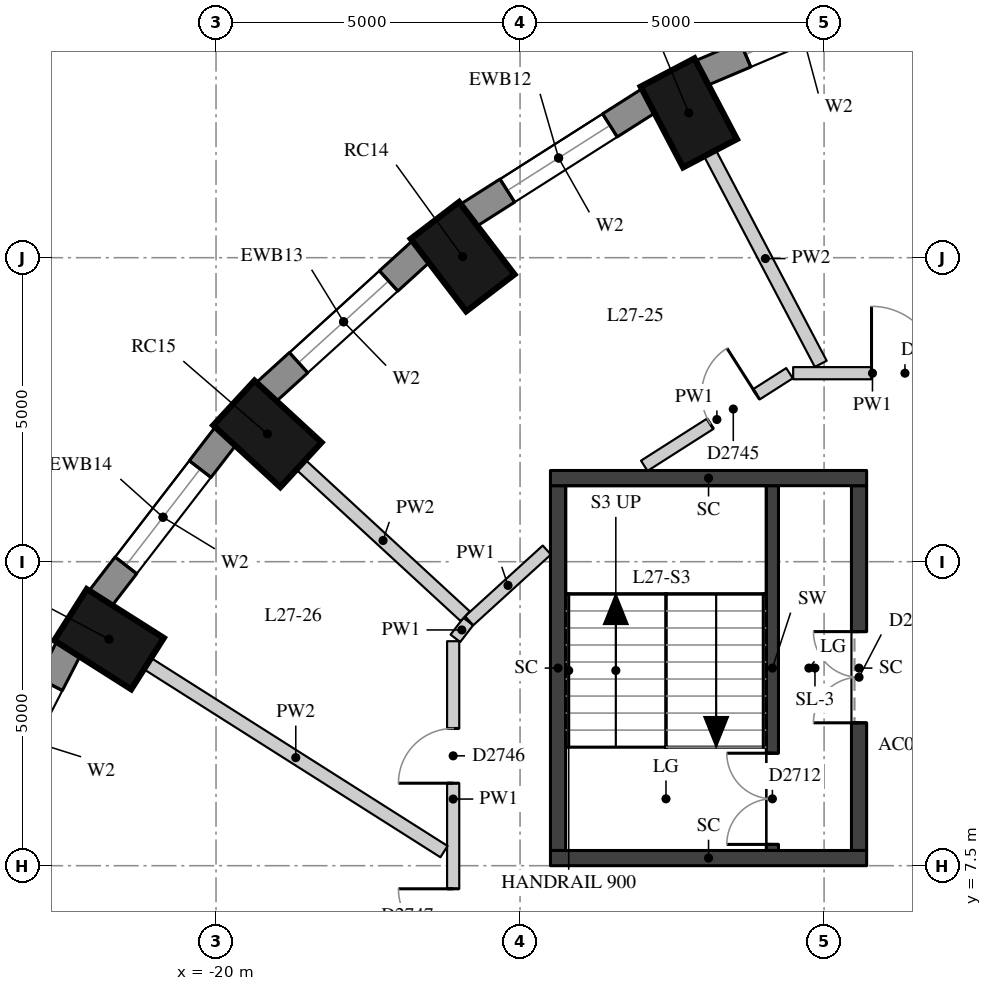
"""IFC4 building model, lengths in metres.
Left out: names, types, materials, properties, quantities, classifications, styles, units other than length and angle.
Written with IfcOpenShell. Run it as: python <this file> out.ifc"""

import sys

from ifc_helpers import new_model, si_unit, direction, frame, frame_2d, origin, origin_2d, place, context, subcontext, project, spatial, rectangle, extrude, element, fill, save


model = new_model("IFC4")
c1 = context("Model", 3, precision=1e-05, world=origin(), true_north=direction((0.0, 1.0)))
c2 = subcontext(c1, "Body", "Model", "MODEL_VIEW")
j1 = project(units=[si_unit("LENGTHUNIT", "METRE"), si_unit("PLANEANGLEUNIT", "RADIAN")], contexts=[c1])
p1 = place(None, origin())
s1 = spatial("IfcSite", under=j1, at=p1, CompositionType="ELEMENT")
p2 = place(p1, origin())
s2 = spatial("IfcBuilding", under=s1, at=p2, CompositionType="ELEMENT")
p3 = place(p2, frame((0.0, 0.0, 98.8)))
s3 = spatial("IfcBuildingStorey", under=s2, at=p3, CompositionType="ELEMENT", Elevation=98.8)
for number, where, z_axis, x_axis in (
    (1, (-8.11, 21.624, 0.0), (0.0, 0.0, 1.0), (-0.315, 0.949, 0.0)),
    (2, (-12.225, 19.882, 0.0), (0.0, 0.0, 1.0), (-0.465, 0.885, 0.0)),
    (3, (-15.945, 17.517, 0.0), (0.0, 0.0, 1.0), (-0.607, 0.795, 0.0)),
    (4, (-19.156, 14.602, 0.0), (0.0, 0.0, 1.0), (-0.735, 0.678, 0.0)),
    (5, (-21.76, 11.225, 0.0), (0.0, 0.0, 1.0), (-0.845, 0.536, 0.0)),
):
    element("IfcColumn", number, at=place(p3, frame(where, z_axis=z_axis, x_axis=x_axis)), inside=s3, PredefinedType="COLUMN", context=c2, shape_type="SweptSolid", body=[
        extrude(rectangle(XDim=1.5, YDim=1.0, at=origin_2d()), origin(), (0.0, 0.0, 1.0), 3.3),
    ])
p4 = place(p3, frame((-8.718, 21.934, 0.0), z_axis=(0.0, 0.0, 1.0), x_axis=(-0.920879975612, -0.389846213932, 0.0)))
e6 = element("IfcWall", 6, at=p4, inside=s3, PredefinedType="SOLIDWALL", context=c2, shape_type="SweptSolid", body=[
    extrude(rectangle(XDim=3.592, YDim=0.45, at=frame_2d((1.796, 0.0))), origin(), (0.0, 0.0, 1.0), 3.02),
])
p5 = place(p4, frame((0.796, 0.0, 0.4)))
e7 = element("IfcOpeningElement", 7, at=p5, cuts=e6, PredefinedType="OPENING", context=c2, shape_type="SweptSolid", body=[
    extrude(rectangle(XDim=2.0, YDim=1.75, at=frame_2d((1.0, 0.875))), frame((0.0, 0.235, 0.0), z_axis=(0.0, -1.0, 0.0), x_axis=(1.0, 0.0, 0.0)), (0.0, 0.0, 1.0), 0.47),
])
p6 = place(p3, frame((-12.875, 20.087, 0.0), z_axis=(0.0, 0.0, 1.0), x_axis=(-0.843860651879, -0.536562391722, 0.0)))
e8 = element("IfcWall", 8, at=p6, inside=s3, PredefinedType="SOLIDWALL", context=c2, shape_type="SweptSolid", body=[
    extrude(rectangle(XDim=3.532, YDim=0.45, at=frame_2d((1.766, 0.0))), origin(), (0.0, 0.0, 1.0), 3.02),
])
p7 = place(p6, frame((0.766, 0.0, 0.4)))
e9 = element("IfcOpeningElement", 9, at=p7, cuts=e8, PredefinedType="OPENING", context=c2, shape_type="SweptSolid", body=[
    extrude(rectangle(XDim=2.0, YDim=1.75, at=frame_2d((1.0, 0.875))), frame((0.0, 0.235, 0.0), z_axis=(0.0, -1.0, 0.0), x_axis=(1.0, 0.0, 0.0)), (0.0, 0.0, 1.0), 0.47),
])
p8 = place(p3, frame((-16.62, 17.61, 0.0), z_axis=(0.0, 0.0, 1.0), x_axis=(-0.74032902847, -0.672244694739, 0.0)))
e10 = element("IfcWall", 10, at=p8, inside=s3, PredefinedType="SOLIDWALL", context=c2, shape_type="SweptSolid", body=[
    extrude(rectangle(XDim=3.464, YDim=0.45, at=frame_2d((1.732, 0.0))), origin(), (0.0, 0.0, 1.0), 3.02),
])
p9 = place(p8, frame((0.732, 0.0, 0.4)))
e11 = element("IfcOpeningElement", 11, at=p9, cuts=e10, PredefinedType="OPENING", context=c2, shape_type="SweptSolid", body=[
    extrude(rectangle(XDim=2.0, YDim=1.75, at=frame_2d((1.0, 0.875))), frame((0.0, 0.235, 0.0), z_axis=(0.0, -1.0, 0.0), x_axis=(1.0, 0.0, 0.0)), (0.0, 0.0, 1.0), 0.47),
])
p10 = place(p3, frame((-19.835, 14.575, 0.0), z_axis=(0.0, 0.0, 1.0), x_axis=(-0.610693945156, -0.791866721961, 0.0)))
e12 = element("IfcWall", 12, at=p10, inside=s3, PredefinedType="SOLIDWALL", context=c2, shape_type="SweptSolid", body=[
    extrude(rectangle(XDim=3.395, YDim=0.45, at=frame_2d((1.697, 0.0))), origin(), (0.0, 0.0, 1.0), 3.02),
])
p11 = place(p10, frame((0.697, 0.0, 0.4)))
e13 = element("IfcOpeningElement", 13, at=p11, cuts=e12, PredefinedType="OPENING", context=c2, shape_type="SweptSolid", body=[
    extrude(rectangle(XDim=2.0, YDim=1.75, at=frame_2d((1.0, 0.875))), frame((0.0, 0.235, 0.0), z_axis=(0.0, -1.0, 0.0), x_axis=(1.0, 0.0, 0.0)), (0.0, 0.0, 1.0), 0.47),
])
p12 = place(p3, frame((-22.423, 11.077, 0.0), z_axis=(0.0, 0.0, 1.0), x_axis=(-0.456828186229, -0.889554949549, 0.0)))
e14 = element("IfcWall", 14, at=p12, inside=s3, PredefinedType="SOLIDWALL", context=c2, shape_type="SweptSolid", body=[
    extrude(rectangle(XDim=3.333, YDim=0.45, at=frame_2d((1.667, 0.0))), origin(), (0.0, 0.0, 1.0), 3.02),
])
p13 = place(p12, frame((0.666, 0.0, 0.4)))
e15 = element("IfcOpeningElement", 15, at=p13, cuts=e14, PredefinedType="OPENING", context=c2, shape_type="SweptSolid", body=[
    extrude(rectangle(XDim=2.0, YDim=1.75, at=frame_2d((1.0, 0.875))), frame((0.0, 0.235, 0.0), z_axis=(0.0, -1.0, 0.0), x_axis=(1.0, 0.0, 0.0)), (0.0, 0.0, 1.0), 0.47),
])
p14 = place(p3, frame((-10.85, 7.75, 0.0), z_axis=(0.0, 0.0, 1.0), x_axis=(0.0, 1.0, 0.0)))
e16 = element("IfcWall", 16, at=p14, inside=s3, PredefinedType="SHEAR", context=c2, shape_type="SweptSolid", body=[
    extrude(rectangle(XDim=6.0, YDim=0.2, at=frame_2d((3.0, 0.0))), origin(), (0.0, 0.0, 1.0), 3.02),
])
p15 = place(p14, frame((0.1, 0.0, 0.0)))
e17 = element("IfcOpeningElement", 17, at=p15, cuts=e16, PredefinedType="OPENING", context=c2, shape_type="SweptSolid", body=[
    extrude(rectangle(XDim=1.5, YDim=2.1, at=frame_2d((0.75, 1.05))), frame((0.0, 0.11, 0.0), z_axis=(0.0, -1.0, 0.0), x_axis=(1.0, 0.0, 0.0)), (0.0, 0.0, 1.0), 0.22),
])
p16 = place(p3, frame((-14.375, 7.75, -0.28), z_axis=(0.0, 0.0, 1.0), x_axis=(0.0, 1.0, 0.0)))
e18 = element("IfcWall", 18, at=p16, inside=s3, PredefinedType="SHEAR", context=c2, shape_type="SweptSolid", body=[
    extrude(rectangle(XDim=6.0, YDim=0.25, at=frame_2d((3.0, 0.0))), origin(), (0.0, 0.0, 1.0), 3.3),
])
p17 = place(p3, frame((-9.425, 7.75, -0.28), z_axis=(0.0, 0.0, 1.0), x_axis=(0.0, 1.0, 0.0)))
e19 = element("IfcWall", 19, at=p17, inside=s3, PredefinedType="SHEAR", context=c2, shape_type="SweptSolid", body=[
    extrude(rectangle(XDim=6.0, YDim=0.25, at=frame_2d((3.0, 0.0))), origin(), (0.0, 0.0, 1.0), 3.3),
])
p18 = place(p17, frame((2.1, 0.0, 0.28)))
e20 = element("IfcOpeningElement", 20, at=p18, cuts=e19, PredefinedType="OPENING", context=c2, shape_type="SweptSolid", body=[
    extrude(rectangle(XDim=1.5, YDim=2.1, at=frame_2d((0.75, 1.05))), frame((0.0, 0.135, 0.0), z_axis=(0.0, -1.0, 0.0), x_axis=(1.0, 0.0, 0.0)), (0.0, 0.0, 1.0), 0.27),
])
for number, where, z_axis, x_axis in (
    (21, (-14.5, 13.875, -0.28), (0.0, 0.0, 1.0), (1.0, 0.0, 0.0)),
    (22, (-14.5, 7.625, -0.28), (0.0, 0.0, 1.0), (1.0, 0.0, 0.0)),
):
    element("IfcWall", number, at=place(p3, frame(where, z_axis=z_axis, x_axis=x_axis)), inside=s3, PredefinedType="SHEAR", context=c2, shape_type="SweptSolid", body=[
        extrude(rectangle(XDim=5.2, YDim=0.25, at=frame_2d((2.6, 0.0))), origin(), (0.0, 0.0, 1.0), 3.3),
    ])
p19 = place(p3, frame((-16.1, 6.0, 0.0), z_axis=(0.0, 0.0, 1.0), x_axis=(0.0, 1.0, 0.0)))
e23 = element("IfcWall", 23, at=p19, inside=s3, PredefinedType="PARTITIONING", context=c2, shape_type="SweptSolid", body=[
    extrude(rectangle(XDim=5.192, YDim=0.2, at=frame_2d((2.596, 0.0))), origin(), (0.0, 0.0, 1.0), 3.02),
])
p20 = place(p19, frame((2.857, 0.0, 0.0)))
e24 = element("IfcOpeningElement", 24, at=p20, cuts=e23, PredefinedType="OPENING", context=c2, shape_type="SweptSolid", body=[
    extrude(rectangle(XDim=0.9, YDim=2.1, at=frame_2d((0.45, 1.05))), frame((0.0, 0.11, 0.0), z_axis=(0.0, -1.0, 0.0), x_axis=(1.0, 0.0, 0.0)), (0.0, 0.0, 1.0), 0.22),
])
p21 = place(p19, frame((0.22, 0.0, 0.0)))
e25 = element("IfcOpeningElement", 25, at=p21, cuts=e23, PredefinedType="OPENING", context=c2, shape_type="SweptSolid", body=[
    extrude(rectangle(XDim=0.9, YDim=2.1, at=frame_2d((0.45, 1.05))), frame((0.0, 0.11, 0.0), z_axis=(0.0, -1.0, 0.0), x_axis=(1.0, 0.0, 0.0)), (0.0, 0.0, 1.0), 0.22),
])
p22 = place(p3, frame((-16.063, 11.24, 0.0), z_axis=(0.0, 0.0, 1.0), x_axis=(0.609744747854, 0.792597844096, 0.0)))
e26 = element("IfcWall", 26, at=p22, inside=s3, PredefinedType="PARTITIONING", context=c2, shape_type="SweptSolid", body=[
    extrude(rectangle(XDim=0.347, YDim=0.2, at=frame_2d((0.174, 0.0))), origin(), (0.0, 0.0, 1.0), 3.02),
])
p23 = place(p3, frame((-15.837, 11.528, 0.0), z_axis=(0.0, 0.0, 1.0), x_axis=(0.739402681643, 0.673263450946, 0.0)))
e27 = element("IfcWall", 27, at=p23, inside=s3, PredefinedType="PARTITIONING", context=c2, shape_type="SweptSolid", body=[
    extrude(rectangle(XDim=1.728, YDim=0.2, at=frame_2d((0.864, 0.0))), origin(), (0.0, 0.0, 1.0), 3.02),
])
p24 = place(p3, frame((-12.957, 14.077, 0.0), z_axis=(0.0, 0.0, 1.0), x_axis=(0.84319985174, 0.537600232538, 0.0)))
e28 = element("IfcWall", 28, at=p24, inside=s3, PredefinedType="PARTITIONING", context=c2, shape_type="SweptSolid", body=[
    extrude(rectangle(XDim=2.833, YDim=0.2, at=frame_2d((1.417, 0.0))), origin(), (0.0, 0.0, 1.0), 3.02),
])
p25 = place(p24, frame((1.286, 0.0, 0.0)))
e29 = element("IfcOpeningElement", 29, at=p25, cuts=e28, PredefinedType="OPENING", context=c2, shape_type="SweptSolid", body=[
    extrude(rectangle(XDim=0.9, YDim=2.1, at=frame_2d((0.45, 1.05))), frame((0.0, 0.11, 0.0), z_axis=(0.0, -1.0, 0.0), x_axis=(1.0, 0.0, 0.0)), (0.0, 0.0, 1.0), 0.22),
])
p26 = place(p3, frame((-10.509, 15.6, 0.0), z_axis=(0.0, 0.0, 1.0), x_axis=(1.0, 0.0, 0.0)))
e30 = element("IfcWall", 30, at=p26, inside=s3, PredefinedType="PARTITIONING", context=c2, shape_type="SweptSolid", body=[
    extrude(rectangle(XDim=2.609, YDim=0.2, at=frame_2d((1.304, 0.0))), origin(), (0.0, 0.0, 1.0), 3.02),
])
p27 = place(p26, frame((1.289, 0.0, 0.0)))
e31 = element("IfcOpeningElement", 31, at=p27, cuts=e30, PredefinedType="OPENING", context=c2, shape_type="SweptSolid", body=[
    extrude(rectangle(XDim=1.1, YDim=2.1, at=frame_2d((0.55, 1.05))), frame((0.0, 0.11, 0.0), z_axis=(0.0, -1.0, 0.0), x_axis=(1.0, 0.0, 0.0)), (0.0, 0.0, 1.0), 0.22),
])
p28 = place(p3, frame((-11.876, 19.218, 0.0), z_axis=(0.0, 0.0, 1.0), x_axis=(0.465386433174, -0.885107602395, 0.0)))
e32 = element("IfcWall", 32, at=p28, inside=s3, PredefinedType="PARTITIONING", context=c2, shape_type="SweptSolid", body=[
    extrude(rectangle(XDim=3.914, YDim=0.22, at=frame_2d((1.957, 0.0))), origin(), (0.0, 0.0, 1.0), 3.02),
])
p29 = place(p3, frame((-18.604, 14.094, 0.0), z_axis=(0.0, 0.0, 1.0), x_axis=(0.73529495628, -0.677747244383, 0.0)))
e33 = element("IfcWall", 33, at=p29, inside=s3, PredefinedType="PARTITIONING", context=c2, shape_type="SweptSolid", body=[
    extrude(rectangle(XDim=3.674, YDim=0.22, at=frame_2d((1.837, 0.0))), origin(), (0.0, 0.0, 1.0), 3.02),
])
p30 = place(p3, frame((-21.126, 10.823, 0.0), z_axis=(0.0, 0.0, 1.0), x_axis=(0.844518840625, -0.535525842355, 0.0)))
e34 = element("IfcWall", 34, at=p30, inside=s3, PredefinedType="PARTITIONING", context=c2, shape_type="SweptSolid", body=[
    extrude(rectangle(XDim=5.773, YDim=0.22, at=frame_2d((2.887, 0.0))), origin(), (0.0, 0.0, 1.0), 3.02),
])
p31 = place(p5, origin())
e35 = element("IfcWindow", 35, at=p31, inside=s3, PartitioningType="SINGLE_PANEL", PredefinedType="WINDOW", context=c2, shape_type="SweptSolid", body=[
    extrude(rectangle(XDim=2.0, YDim=1.75, at=frame_2d((1.0, 0.875))), frame((0.0, 0.035, 0.0), z_axis=(0.0, -1.0, 0.0), x_axis=(1.0, 0.0, 0.0)), (0.0, 0.0, 1.0), 0.06),
])
fill(e7, e35)
p32 = place(p7, origin())
e36 = element("IfcWindow", 36, at=p32, inside=s3, PartitioningType="SINGLE_PANEL", PredefinedType="WINDOW", context=c2, shape_type="SweptSolid", body=[
    extrude(rectangle(XDim=2.0, YDim=1.75, at=frame_2d((1.0, 0.875))), frame((0.0, 0.035, 0.0), z_axis=(0.0, -1.0, 0.0), x_axis=(1.0, 0.0, 0.0)), (0.0, 0.0, 1.0), 0.06),
])
fill(e9, e36)
p33 = place(p9, origin())
e37 = element("IfcWindow", 37, at=p33, inside=s3, PartitioningType="SINGLE_PANEL", PredefinedType="WINDOW", context=c2, shape_type="SweptSolid", body=[
    extrude(rectangle(XDim=2.0, YDim=1.75, at=frame_2d((1.0, 0.875))), frame((0.0, 0.035, 0.0), z_axis=(0.0, -1.0, 0.0), x_axis=(1.0, 0.0, 0.0)), (0.0, 0.0, 1.0), 0.06),
])
fill(e11, e37)
p34 = place(p11, origin())
e38 = element("IfcWindow", 38, at=p34, inside=s3, PartitioningType="SINGLE_PANEL", PredefinedType="WINDOW", context=c2, shape_type="SweptSolid", body=[
    extrude(rectangle(XDim=2.0, YDim=1.75, at=frame_2d((1.0, 0.875))), frame((0.0, 0.035, 0.0), z_axis=(0.0, -1.0, 0.0), x_axis=(1.0, 0.0, 0.0)), (0.0, 0.0, 1.0), 0.06),
])
fill(e13, e38)
p35 = place(p13, origin())
e39 = element("IfcWindow", 39, at=p35, inside=s3, PartitioningType="SINGLE_PANEL", PredefinedType="WINDOW", context=c2, shape_type="SweptSolid", body=[
    extrude(rectangle(XDim=2.0, YDim=1.75, at=frame_2d((1.0, 0.875))), frame((0.0, 0.035, 0.0), z_axis=(0.0, -1.0, 0.0), x_axis=(1.0, 0.0, 0.0)), (0.0, 0.0, 1.0), 0.06),
])
fill(e15, e39)
p36 = place(p15, origin())
e40 = element("IfcDoor", 40, at=p36, inside=s3, OperationType="DOUBLE_DOOR_SINGLE_SWING", PredefinedType="DOOR", context=c2, shape_type="SweptSolid", body=[
    extrude(rectangle(XDim=1.5, YDim=2.1, at=frame_2d((0.75, 1.05))), frame((0.0, 0.025, 0.0), z_axis=(0.0, -1.0, 0.0), x_axis=(1.0, 0.0, 0.0)), (0.0, 0.0, 1.0), 0.05),
])
fill(e17, e40)
p37 = place(p18, origin())
e41 = element("IfcDoor", 41, at=p37, inside=s3, OperationType="DOUBLE_DOOR_SINGLE_SWING", PredefinedType="DOOR", context=c2, shape_type="SweptSolid", body=[
    extrude(rectangle(XDim=1.5, YDim=2.1, at=frame_2d((0.75, 1.05))), frame((0.0, 0.025, 0.0), z_axis=(0.0, -1.0, 0.0), x_axis=(1.0, 0.0, 0.0)), (0.0, 0.0, 1.0), 0.05),
])
fill(e20, e41)
p38 = place(p27, origin())
e42 = element("IfcDoor", 42, at=p38, inside=s3, OperationType="SINGLE_SWING_LEFT", PredefinedType="DOOR", context=c2, shape_type="SweptSolid", body=[
    extrude(rectangle(XDim=1.1, YDim=2.1, at=frame_2d((0.55, 1.05))), frame((0.0, 0.025, 0.0), z_axis=(0.0, -1.0, 0.0), x_axis=(1.0, 0.0, 0.0)), (0.0, 0.0, 1.0), 0.05),
])
fill(e31, e42)
p39 = place(p25, origin())
e43 = element("IfcDoor", 43, at=p39, inside=s3, OperationType="SINGLE_SWING_RIGHT", PredefinedType="DOOR", context=c2, shape_type="SweptSolid", body=[
    extrude(rectangle(XDim=0.9, YDim=2.1, at=frame_2d((0.45, 1.05))), frame((0.0, 0.025, 0.0), z_axis=(0.0, -1.0, 0.0), x_axis=(1.0, 0.0, 0.0)), (0.0, 0.0, 1.0), 0.05),
])
fill(e29, e43)
p40 = place(p20, origin())
e44 = element("IfcDoor", 44, at=p40, inside=s3, OperationType="SINGLE_SWING_LEFT", PredefinedType="DOOR", context=c2, shape_type="SweptSolid", body=[
    extrude(rectangle(XDim=0.9, YDim=2.1, at=frame_2d((0.45, 1.05))), frame((0.0, 0.025, 0.0), z_axis=(0.0, -1.0, 0.0), x_axis=(1.0, 0.0, 0.0)), (0.0, 0.0, 1.0), 0.05),
])
fill(e24, e44)
p41 = place(p21, origin())
e45 = element("IfcDoor", 45, at=p41, inside=s3, OperationType="SINGLE_SWING_RIGHT", PredefinedType="DOOR", context=c2, shape_type="SweptSolid", body=[
    extrude(rectangle(XDim=0.9, YDim=2.1, at=frame_2d((0.45, 1.05))), frame((0.0, 0.025, 0.0), z_axis=(0.0, -1.0, 0.0), x_axis=(1.0, 0.0, 0.0)), (0.0, 0.0, 1.0), 0.05),
])
fill(e25, e45)
save(model, sys.argv[1])
